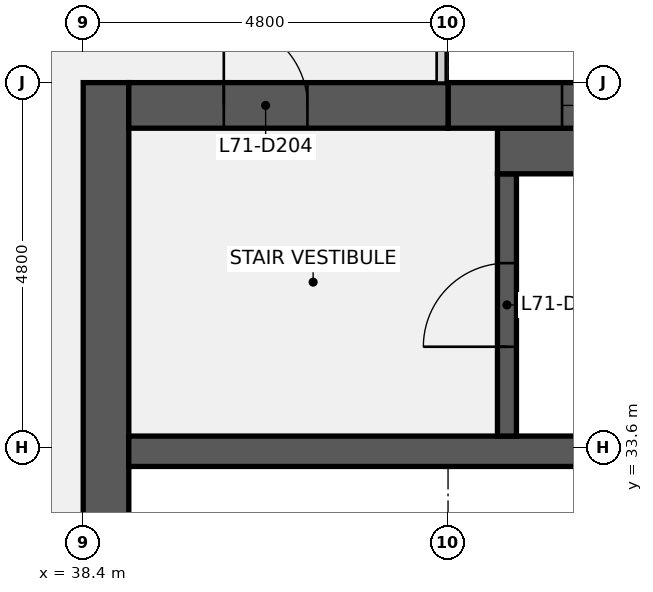
"""IFC4 building model, lengths in metres.
Left out: names, types, materials, properties, quantities, classifications, styles, units other than length and angle.
Written with IfcOpenShell. Run it as: python <this file> out.ifc"""

import sys

from ifc_helpers import new_model, si_unit, direction, frame, frame_2d, origin, place, context, subcontext, project, spatial, rectangle, extrude, element, fill, save


model = new_model("IFC4")
c1 = context("Model", 3, precision=1e-05, world=origin(), true_north=direction((0.0, 1.0)))
c2 = subcontext(c1, "Body", "Model", "MODEL_VIEW")
j1 = project(units=[si_unit("LENGTHUNIT", "METRE"), si_unit("PLANEANGLEUNIT", "RADIAN")], contexts=[c1])
p1 = place(None, origin())
s1 = spatial("IfcSite", under=j1, at=p1, CompositionType="ELEMENT")
p2 = place(p1, origin())
s2 = spatial("IfcBuilding", under=s1, at=p2, CompositionType="ELEMENT")
p3 = place(p2, frame((0.0, 0.0, 322.3)))
s3 = spatial("IfcBuildingStorey", under=s2, at=p3, CompositionType="ELEMENT", Elevation=322.3)
p4 = place(p3, frame((38.7, 9.6, 0.0), z_axis=(0.0, 0.0, 1.0), x_axis=(0.0, 1.0, 0.0)))
e1 = element("IfcWall", 1, at=p4, inside=s3, PredefinedType="SHEAR", context=c2, shape_type="SweptSolid", body=[
    extrude(rectangle(XDim=28.8, YDim=0.6, at=frame_2d((14.4, 0.0))), origin(), (0.0, 0.0, 1.0), 3.84),
])
p5 = place(p4, frame((8.7, 0.0, 0.0)))
e2 = element("IfcOpeningElement", 2, at=p5, cuts=e1, PredefinedType="OPENING", context=c2, shape_type="SweptSolid", body=[
    extrude(rectangle(XDim=1.8, YDim=2.1, at=frame_2d((0.9, 1.05))), frame((0.0, 0.31, 0.0), z_axis=(0.0, -1.0, 0.0), x_axis=(1.0, 0.0, 0.0)), (0.0, 0.0, 1.0), 0.62),
])
p6 = place(p4, frame((18.3, 0.0, 0.0)))
e3 = element("IfcOpeningElement", 3, at=p6, cuts=e1, PredefinedType="OPENING", context=c2, shape_type="SweptSolid", body=[
    extrude(rectangle(XDim=1.8, YDim=2.1, at=frame_2d((0.9, 1.05))), frame((0.0, 0.31, 0.0), z_axis=(0.0, -1.0, 0.0), x_axis=(1.0, 0.0, 0.0)), (0.0, 0.0, 1.0), 0.62),
])
p7 = place(p3, frame((39.0, 33.55, 0.0), z_axis=(0.0, 0.0, 1.0), x_axis=(1.0, 0.0, 0.0)))
e4 = element("IfcWall", 4, at=p7, inside=s3, PredefinedType="SHEAR", context=c2, shape_type="SweptSolid", body=[
    extrude(rectangle(XDim=18.0, YDim=0.4, at=frame_2d((9.0, 0.0))), origin(), (0.0, 0.0, 1.0), 3.84),
])
p8 = place(p3, frame((43.975, 33.75, 0.0), z_axis=(0.0, 0.0, 1.0), x_axis=(0.0, 1.0, 0.0)))
e5 = element("IfcWall", 5, at=p8, inside=s3, PredefinedType="SHEAR", context=c2, shape_type="SweptSolid", body=[
    extrude(rectangle(XDim=3.45, YDim=0.25, at=frame_2d((1.725, 0.0))), origin(), (0.0, 0.0, 1.0), 3.84),
])
p9 = place(p8, frame((1.175, 0.0, 0.0)))
e6 = element("IfcOpeningElement", 6, at=p9, cuts=e5, PredefinedType="OPENING", context=c2, shape_type="SweptSolid", body=[
    extrude(rectangle(XDim=1.1, YDim=2.1, at=frame_2d((0.55, 1.05))), frame((0.0, 0.135, 0.0), z_axis=(0.0, -1.0, 0.0), x_axis=(1.0, 0.0, 0.0)), (0.0, 0.0, 1.0), 0.27),
])
p10 = place(p3, frame((43.85, 37.5, 0.0), z_axis=(0.0, 0.0, 1.0), x_axis=(1.0, 0.0, 0.0)))
e7 = element("IfcWall", 7, at=p10, inside=s3, PredefinedType="SHEAR", context=c2, shape_type="SweptSolid", body=[
    extrude(rectangle(XDim=7.5, YDim=0.6, at=frame_2d((3.75, 0.0))), origin(), (0.0, 0.0, 1.0), 3.84),
])
p11 = place(p3, frame((43.2, 38.1, 0.0), z_axis=(0.0, 0.0, 1.0), x_axis=(1.0, 0.0, 0.0)))
e8 = element("IfcWall", 8, at=p11, inside=s3, PredefinedType="SHEAR", context=c2, shape_type="SweptSolid", body=[
    extrude(rectangle(XDim=13.8, YDim=0.6, at=frame_2d((6.9, 0.0))), origin(), (0.0, 0.0, 1.0), 3.84),
])
p12 = place(p11, frame((6.3, 0.0, 0.9)))
e9 = element("IfcOpeningElement", 9, at=p12, cuts=e8, PredefinedType="OPENING", context=c2, shape_type="SweptSolid", body=[
    extrude(rectangle(XDim=1.8, YDim=1.5, at=frame_2d((0.9, 0.75))), frame((0.0, 0.31, 0.0), z_axis=(0.0, -1.0, 0.0), x_axis=(1.0, 0.0, 0.0)), (0.0, 0.0, 1.0), 0.62),
])
p13 = place(p11, frame((1.5, 0.0, 0.9)))
e10 = element("IfcOpeningElement", 10, at=p13, cuts=e8, PredefinedType="OPENING", context=c2, shape_type="SweptSolid", body=[
    extrude(rectangle(XDim=1.8, YDim=1.5, at=frame_2d((0.9, 0.75))), frame((0.0, 0.31, 0.0), z_axis=(0.0, -1.0, 0.0), x_axis=(1.0, 0.0, 0.0)), (0.0, 0.0, 1.0), 0.62),
])
p14 = place(p3, frame((39.0, 38.1, 0.0), z_axis=(0.0, 0.0, 1.0), x_axis=(1.0, 0.0, 0.0)))
e11 = element("IfcWall", 11, at=p14, inside=s3, PredefinedType="SHEAR", context=c2, shape_type="SweptSolid", body=[
    extrude(rectangle(XDim=4.2, YDim=0.6, at=frame_2d((2.1, 0.0))), origin(), (0.0, 0.0, 1.0), 3.84),
])
p15 = place(p14, frame((1.25, 0.0, 0.0)))
e12 = element("IfcOpeningElement", 12, at=p15, cuts=e11, PredefinedType="OPENING", context=c2, shape_type="SweptSolid", body=[
    extrude(rectangle(XDim=1.1, YDim=2.1, at=frame_2d((0.55, 1.05))), frame((0.0, 0.31, 0.0), z_axis=(0.0, -1.0, 0.0), x_axis=(1.0, 0.0, 0.0)), (0.0, 0.0, 1.0), 0.62),
])
p16 = place(p9, origin())
e13 = element("IfcDoor", 13, at=p16, inside=s3, OperationType="SINGLE_SWING_LEFT", PredefinedType="DOOR", context=c2, shape_type="SweptSolid", body=[
    extrude(rectangle(XDim=1.1, YDim=2.1, at=frame_2d((0.55, 1.05))), frame((0.0, 0.025, 0.0), z_axis=(0.0, -1.0, 0.0), x_axis=(1.0, 0.0, 0.0)), (0.0, 0.0, 1.0), 0.05),
])
fill(e6, e13)
p17 = place(p15, origin())
e14 = element("IfcDoor", 14, at=p17, inside=s3, OperationType="SINGLE_SWING_LEFT", PredefinedType="DOOR", context=c2, shape_type="SweptSolid", body=[
    extrude(rectangle(XDim=1.1, YDim=2.1, at=frame_2d((0.55, 1.05))), frame((0.0, 0.025, 0.0), z_axis=(0.0, -1.0, 0.0), x_axis=(1.0, 0.0, 0.0)), (0.0, 0.0, 1.0), 0.05),
])
fill(e12, e14)
p18 = place(p13, origin())
e15 = element("IfcWindow", 15, at=p18, inside=s3, PartitioningType="SINGLE_PANEL", PredefinedType="WINDOW", context=c2, shape_type="SweptSolid", body=[
    extrude(rectangle(XDim=1.8, YDim=1.5, at=frame_2d((0.9, 0.75))), frame((0.0, 0.03, 0.0), z_axis=(0.0, -1.0, 0.0), x_axis=(1.0, 0.0, 0.0)), (0.0, 0.0, 1.0), 0.06),
])
fill(e10, e15)
save(model, sys.argv[1])
